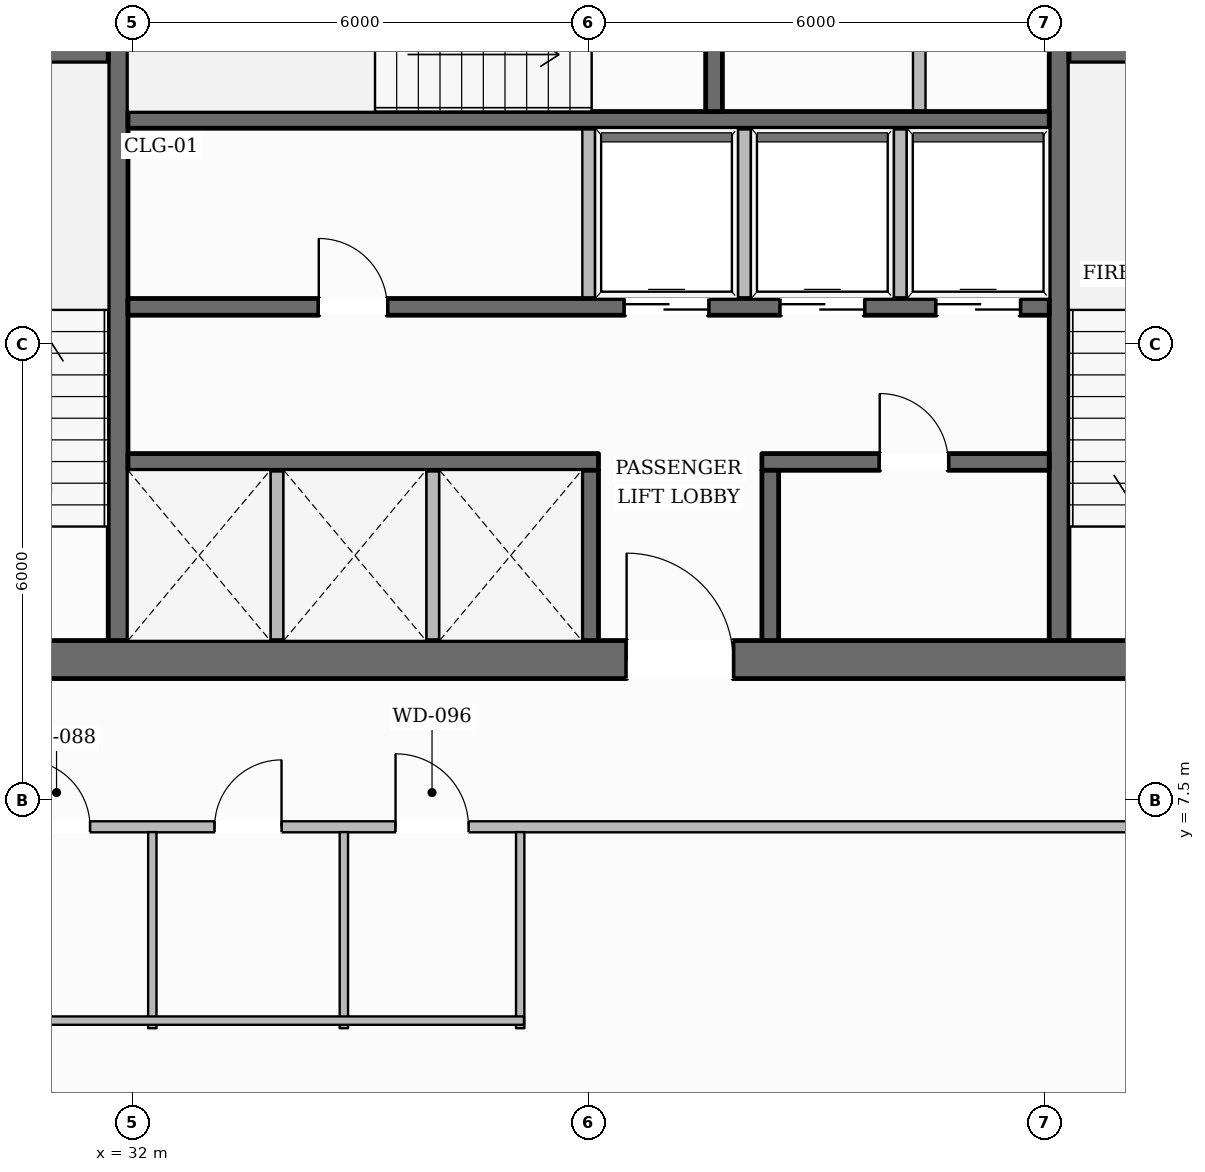
"""IFC4 building model, lengths in metres.
Left out: names, types, materials, properties, quantities, classifications, styles, units other than length and angle.
Written with IfcOpenShell. Run it as: python <this file> out.ifc"""

import sys

from ifc_helpers import new_model, si_unit, direction, frame, frame_2d, origin, place, context, subcontext, project, spatial, rectangle, extrude, element, fill, save


model = new_model("IFC4")
c1 = context("Model", 3, precision=1e-05, world=origin(), true_north=direction((0.0, 1.0)))
c2 = subcontext(c1, "Body", "Model", "MODEL_VIEW")
j1 = project(units=[si_unit("LENGTHUNIT", "METRE"), si_unit("PLANEANGLEUNIT", "RADIAN")], contexts=[c1])
p1 = place(None, origin())
s1 = spatial("IfcSite", under=j1, at=p1, CompositionType="ELEMENT")
p2 = place(p1, origin())
s2 = spatial("IfcBuilding", under=s1, at=p2, CompositionType="ELEMENT")
p3 = place(p2, frame((0.0, 0.0, 97.05)))
s3 = spatial("IfcBuildingStorey", under=s2, at=p3, CompositionType="ELEMENT", Elevation=97.05)
p4 = place(p3, frame((27.98, 9.35, 0.0), z_axis=(0.0, 0.0, 1.0), x_axis=(1.0, 0.0, 0.0)))
e1 = element("IfcWall", 1, at=p4, inside=s3, PredefinedType="SOLIDWALL", context=c2, shape_type="SweptSolid", body=[
    extrude(rectangle(XDim=20.04, YDim=0.5, at=frame_2d((10.02, 0.0))), origin(), (0.0, 0.0, 1.0), 3.6),
])
p5 = place(p4, frame((10.52, 0.0, 0.0)))
e2 = element("IfcOpeningElement", 2, at=p5, cuts=e1, PredefinedType="OPENING", context=c2, shape_type="SweptSolid", body=[
    extrude(rectangle(XDim=1.4, YDim=2.2, at=frame_2d((0.7, 1.1))), frame((0.0, 0.26, 0.0), z_axis=(0.0, -1.0, 0.0), x_axis=(1.0, 0.0, 0.0)), (0.0, 0.0, 1.0), 0.52),
])
p6 = place(p3, frame((31.81, 9.6, 0.0), z_axis=(0.0, 0.0, 1.0), x_axis=(0.0, 1.0, 0.0)))
e3 = element("IfcWall", 3, at=p6, inside=s3, PredefinedType="SHEAR", context=c2, shape_type="SweptSolid", body=[
    extrude(rectangle(XDim=13.0, YDim=0.26, at=frame_2d((6.5, 0.0))), origin(), (0.0, 0.0, 1.0), 3.6),
])
p7 = place(p6, frame((10.925, 0.0, 0.0)))
e4 = element("IfcOpeningElement", 4, at=p7, cuts=e3, PredefinedType="OPENING", context=c2, shape_type="SweptSolid", body=[
    extrude(rectangle(XDim=1.25, YDim=2.25, at=frame_2d((0.625, 1.125))), frame((0.0, 0.14, 0.0), z_axis=(0.0, -1.0, 0.0), x_axis=(1.0, 0.0, 0.0)), (0.0, 0.0, 1.0), 0.28),
])
p8 = place(p3, frame((44.19, 9.6, 0.0), z_axis=(0.0, 0.0, 1.0), x_axis=(0.0, 1.0, 0.0)))
e5 = element("IfcWall", 5, at=p8, inside=s3, PredefinedType="SHEAR", context=c2, shape_type="SweptSolid", body=[
    extrude(rectangle(XDim=13.0, YDim=0.26, at=frame_2d((6.5, 0.0))), origin(), (0.0, 0.0, 1.0), 3.6),
])
p9 = place(p8, frame((10.925, 0.0, 0.0)))
e6 = element("IfcOpeningElement", 6, at=p9, cuts=e5, PredefinedType="OPENING", context=c2, shape_type="SweptSolid", body=[
    extrude(rectangle(XDim=1.25, YDim=2.25, at=frame_2d((0.625, 1.125))), frame((0.0, 0.14, 0.0), z_axis=(0.0, -1.0, 0.0), x_axis=(1.0, 0.0, 0.0)), (0.0, 0.0, 1.0), 0.28),
])
for number, where, z_axis, x_axis in (
    (7, (28.48, 17.33, 0.0), (0.0, 0.0, 1.0), (1.0, 0.0, 0.0)),
    (8, (44.32, 17.33, 0.0), (0.0, 0.0, 1.0), (1.0, 0.0, 0.0)),
):
    element("IfcWall", number, at=place(p3, frame(where, z_axis=z_axis, x_axis=x_axis)), inside=s3, PredefinedType="SHEAR", context=c2, shape_type="SweptSolid", body=[
        extrude(rectangle(XDim=3.2, YDim=0.26, at=frame_2d((1.6, 0.0))), origin(), (0.0, 0.0, 1.0), 3.6),
    ])
p10 = place(p3, frame((31.94, 16.45, 0.0), z_axis=(0.0, 0.0, 1.0), x_axis=(1.0, 0.0, 0.0)))
e9 = element("IfcWall", 9, at=p10, inside=s3, PredefinedType="SOLIDWALL", context=c2, shape_type="SweptSolid", body=[
    extrude(rectangle(XDim=12.12, YDim=0.22, at=frame_2d((6.06, 0.0))), origin(), (0.0, 0.0, 1.0), 3.6),
])
p11 = place(p3, frame((39.65, 16.56, 0.0), z_axis=(0.0, 0.0, 1.0), x_axis=(0.0, 1.0, 0.0)))
e10 = element("IfcWall", 10, at=p11, inside=s3, PredefinedType="SOLIDWALL", context=c2, shape_type="SweptSolid", body=[
    extrude(rectangle(XDim=3.2, YDim=0.22, at=frame_2d((1.6, 0.0))), origin(), (0.0, 0.0, 1.0), 3.6),
])
p12 = place(p3, frame((31.94, 13.99, 0.0), z_axis=(0.0, 0.0, 1.0), x_axis=(1.0, 0.0, 0.0)))
e11 = element("IfcWall", 11, at=p12, inside=s3, PredefinedType="SOLIDWALL", context=c2, shape_type="SweptSolid", body=[
    extrude(rectangle(XDim=12.12, YDim=0.22, at=frame_2d((6.06, 0.0))), origin(), (0.0, 0.0, 1.0), 3.6),
])
p13 = place(p12, frame((2.51, 0.0, 0.0)))
e12 = element("IfcOpeningElement", 12, at=p13, cuts=e11, PredefinedType="OPENING", context=c2, shape_type="SweptSolid", body=[
    extrude(rectangle(XDim=0.9, YDim=2.1, at=frame_2d((0.45, 1.05))), frame((0.0, 0.12, 0.0), z_axis=(0.0, -1.0, 0.0), x_axis=(1.0, 0.0, 0.0)), (0.0, 0.0, 1.0), 0.24),
])
p14 = place(p12, frame((6.535, 0.0, 0.0)))
e13 = element("IfcOpeningElement", 13, at=p14, cuts=e11, PredefinedType="OPENING", context=c2, shape_type="SweptSolid", body=[
    extrude(rectangle(XDim=1.1, YDim=2.2, at=frame_2d((0.55, 1.1))), frame((0.0, 0.12, 0.0), z_axis=(0.0, -1.0, 0.0), x_axis=(1.0, 0.0, 0.0)), (0.0, 0.0, 1.0), 0.24),
])
p15 = place(p12, frame((8.585, 0.0, 0.0)))
e14 = element("IfcOpeningElement", 14, at=p15, cuts=e11, PredefinedType="OPENING", context=c2, shape_type="SweptSolid", body=[
    extrude(rectangle(XDim=1.1, YDim=2.2, at=frame_2d((0.55, 1.1))), frame((0.0, 0.12, 0.0), z_axis=(0.0, -1.0, 0.0), x_axis=(1.0, 0.0, 0.0)), (0.0, 0.0, 1.0), 0.24),
])
p16 = place(p12, frame((10.635, 0.0, 0.0)))
e15 = element("IfcOpeningElement", 15, at=p16, cuts=e11, PredefinedType="OPENING", context=c2, shape_type="SweptSolid", body=[
    extrude(rectangle(XDim=1.1, YDim=2.2, at=frame_2d((0.55, 1.1))), frame((0.0, 0.12, 0.0), z_axis=(0.0, -1.0, 0.0), x_axis=(1.0, 0.0, 0.0)), (0.0, 0.0, 1.0), 0.24),
])
p17 = place(p3, frame((31.94, 11.95, 0.0), z_axis=(0.0, 0.0, 1.0), x_axis=(1.0, 0.0, 0.0)))
e16 = element("IfcWall", 16, at=p17, inside=s3, PredefinedType="SOLIDWALL", context=c2, shape_type="SweptSolid", body=[
    extrude(rectangle(XDim=6.19, YDim=0.22, at=frame_2d((3.095, 0.0))), origin(), (0.0, 0.0, 1.0), 3.6),
])
p18 = place(p3, frame((40.28, 11.95, 0.0), z_axis=(0.0, 0.0, 1.0), x_axis=(1.0, 0.0, 0.0)))
e17 = element("IfcWall", 17, at=p18, inside=s3, PredefinedType="SOLIDWALL", context=c2, shape_type="SweptSolid", body=[
    extrude(rectangle(XDim=3.78, YDim=0.22, at=frame_2d((1.89, 0.0))), origin(), (0.0, 0.0, 1.0), 3.6),
])
p19 = place(p18, frame((1.55, 0.0, 0.0)))
e18 = element("IfcOpeningElement", 18, at=p19, cuts=e17, PredefinedType="OPENING", context=c2, shape_type="SweptSolid", body=[
    extrude(rectangle(XDim=0.9, YDim=2.1, at=frame_2d((0.45, 1.05))), frame((0.0, 0.12, 0.0), z_axis=(0.0, -1.0, 0.0), x_axis=(1.0, 0.0, 0.0)), (0.0, 0.0, 1.0), 0.24),
])
for number, where, z_axis, x_axis in (
    (19, (38.02, 9.6, 0.0), (0.0, 0.0, 1.0), (0.0, 1.0, 0.0)),
    (20, (40.39, 9.6, 0.0), (0.0, 0.0, 1.0), (0.0, 1.0, 0.0)),
):
    element("IfcWall", number, at=place(p3, frame(where, z_axis=z_axis, x_axis=x_axis)), inside=s3, PredefinedType="SOLIDWALL", context=c2, shape_type="SweptSolid", body=[
        extrude(rectangle(XDim=2.24, YDim=0.22, at=frame_2d((1.12, 0.0))), origin(), (0.0, 0.0, 1.0), 3.6),
    ])
p20 = place(p3, frame((14.113, 13.436, 0.0), z_axis=(0.0, 0.0, 1.0), x_axis=(0.493785476093, 0.869583753068, 0.0)))
e21 = element("IfcWall", 21, at=p20, inside=s3, PredefinedType="STANDARD", context=c2, shape_type="SweptSolid", body=[
    extrude(rectangle(XDim=36.023, YDim=0.38, at=frame_2d((18.011, 0.0))), origin(), (0.0, 0.0, 1.0), 3.059),
])
p21 = place(p20, frame((26.417, 0.0, 0.0)))
e22 = element("IfcOpeningElement", 22, at=p21, cuts=e21, PredefinedType="OPENING", context=c2, shape_type="SweptSolid", body=[
    extrude(rectangle(XDim=1.0, YDim=2.2, at=frame_2d((0.5, 1.1))), frame((0.0, 0.2, 0.0), z_axis=(0.0, -1.0, 0.0), x_axis=(1.0, 0.0, 0.0)), (0.0, 0.0, 1.0), 0.4),
])
p22 = place(p20, frame((31.845, 0.0, 0.65)))
e23 = element("IfcOpeningElement", 23, at=p22, cuts=e21, PredefinedType="OPENING", context=c2, shape_type="SweptSolid", body=[
    extrude(rectangle(XDim=1.55, YDim=1.75, at=frame_2d((0.775, 0.875))), frame((0.0, 0.2, 0.0), z_axis=(0.0, -1.0, 0.0), x_axis=(1.0, 0.0, 0.0)), (0.0, 0.0, 1.0), 0.4),
])
p23 = place(p20, frame((20.156, 0.0, 0.65)))
e24 = element("IfcOpeningElement", 24, at=p23, cuts=e21, PredefinedType="OPENING", context=c2, shape_type="SweptSolid", body=[
    extrude(rectangle(XDim=1.55, YDim=1.75, at=frame_2d((0.775, 0.875))), frame((0.0, 0.2, 0.0), z_axis=(0.0, -1.0, 0.0), x_axis=(1.0, 0.0, 0.0)), (0.0, 0.0, 1.0), 0.4),
])
p24 = place(p20, frame((8.466, 0.0, 0.65)))
e25 = element("IfcOpeningElement", 25, at=p24, cuts=e21, PredefinedType="OPENING", context=c2, shape_type="SweptSolid", body=[
    extrude(rectangle(XDim=1.55, YDim=1.75, at=frame_2d((0.775, 0.875))), frame((0.0, 0.2, 0.0), z_axis=(0.0, -1.0, 0.0), x_axis=(1.0, 0.0, 0.0)), (0.0, 0.0, 1.0), 0.4),
])
p25 = place(p20, frame((2.621, 0.0, 0.65)))
e26 = element("IfcOpeningElement", 26, at=p25, cuts=e21, PredefinedType="OPENING", context=c2, shape_type="SweptSolid", body=[
    extrude(rectangle(XDim=1.55, YDim=1.75, at=frame_2d((0.775, 0.875))), frame((0.0, 0.2, 0.0), z_axis=(0.0, -1.0, 0.0), x_axis=(1.0, 0.0, 0.0)), (0.0, 0.0, 1.0), 0.4),
])
p26 = place(p3, frame((44.161, 44.724, 0.0), z_axis=(0.0, 0.0, 1.0), x_axis=(0.496205042728, -0.86820536486, 0.0)))
e27 = element("IfcWall", 27, at=p26, inside=s3, PredefinedType="STANDARD", context=c2, shape_type="SweptSolid", body=[
    extrude(rectangle(XDim=36.193, YDim=0.38, at=frame_2d((18.097, 0.0))), origin(), (0.0, 0.0, 1.0), 3.059),
])
p27 = place(p26, frame((32.008, 0.0, 0.65)))
e28 = element("IfcOpeningElement", 28, at=p27, cuts=e27, PredefinedType="OPENING", context=c2, shape_type="SweptSolid", body=[
    extrude(rectangle(XDim=1.55, YDim=1.75, at=frame_2d((0.775, 0.875))), frame((0.0, 0.2, 0.0), z_axis=(0.0, -1.0, 0.0), x_axis=(1.0, 0.0, 0.0)), (0.0, 0.0, 1.0), 0.4),
])
p28 = place(p26, frame((26.134, 0.0, 0.65)))
e29 = element("IfcOpeningElement", 29, at=p28, cuts=e27, PredefinedType="OPENING", context=c2, shape_type="SweptSolid", body=[
    extrude(rectangle(XDim=1.55, YDim=1.75, at=frame_2d((0.775, 0.875))), frame((0.0, 0.2, 0.0), z_axis=(0.0, -1.0, 0.0), x_axis=(1.0, 0.0, 0.0)), (0.0, 0.0, 1.0), 0.4),
])
p29 = place(p26, frame((20.26, 0.0, 0.65)))
e30 = element("IfcOpeningElement", 30, at=p29, cuts=e27, PredefinedType="OPENING", context=c2, shape_type="SweptSolid", body=[
    extrude(rectangle(XDim=1.55, YDim=1.75, at=frame_2d((0.775, 0.875))), frame((0.0, 0.2, 0.0), z_axis=(0.0, -1.0, 0.0), x_axis=(1.0, 0.0, 0.0)), (0.0, 0.0, 1.0), 0.4),
])
p30 = place(p26, frame((8.513, 0.0, 0.65)))
e31 = element("IfcOpeningElement", 31, at=p30, cuts=e27, PredefinedType="OPENING", context=c2, shape_type="SweptSolid", body=[
    extrude(rectangle(XDim=1.55, YDim=1.75, at=frame_2d((0.775, 0.875))), frame((0.0, 0.2, 0.0), z_axis=(0.0, -1.0, 0.0), x_axis=(1.0, 0.0, 0.0)), (0.0, 0.0, 1.0), 0.4),
])
p31 = place(p26, frame((2.639, 0.0, 0.65)))
e32 = element("IfcOpeningElement", 32, at=p31, cuts=e27, PredefinedType="OPENING", context=c2, shape_type="SweptSolid", body=[
    extrude(rectangle(XDim=1.55, YDim=1.75, at=frame_2d((0.775, 0.875))), frame((0.0, 0.2, 0.0), z_axis=(0.0, -1.0, 0.0), x_axis=(1.0, 0.0, 0.0)), (0.0, 0.0, 1.0), 0.4),
])
for number, where, z_axis, x_axis in (
    (33, (33.9, 9.55, 0.0), (0.0, 0.0, 1.0), (0.0, 1.0, 0.0)),
    (34, (35.95, 9.55, 0.0), (0.0, 0.0, 1.0), (0.0, 1.0, 0.0)),
):
    element("IfcWall", number, at=place(p3, frame(where, z_axis=z_axis, x_axis=x_axis)), inside=s3, PredefinedType="PARTITIONING", context=c2, shape_type="SweptSolid", body=[
        extrude(rectangle(XDim=2.29, YDim=0.165, at=frame_2d((1.145, 0.0))), origin(), (0.0, 0.0, 1.0), 3.6),
    ])
for number, where, z_axis, x_axis in (
    (35, (38.0, 14.1, 0.0), (0.0, 0.0, 1.0), (0.0, 1.0, 0.0)),
    (36, (40.05, 14.1, 0.0), (0.0, 0.0, 1.0), (0.0, 1.0, 0.0)),
    (37, (42.1, 14.1, 0.0), (0.0, 0.0, 1.0), (0.0, 1.0, 0.0)),
):
    element("IfcWall", number, at=place(p3, frame(where, z_axis=z_axis, x_axis=x_axis)), inside=s3, PredefinedType="PARTITIONING", context=c2, shape_type="SweptSolid", body=[
        extrude(rectangle(XDim=2.24, YDim=0.165, at=frame_2d((1.12, 0.0))), origin(), (0.0, 0.0, 1.0), 3.6),
    ])
p32 = place(p3, frame((42.35, 16.56, 0.0), z_axis=(0.0, 0.0, 1.0), x_axis=(0.0, 1.0, 0.0)))
e38 = element("IfcWall", 38, at=p32, inside=s3, PredefinedType="PARTITIONING", context=c2, shape_type="SweptSolid", body=[
    extrude(rectangle(XDim=3.2, YDim=0.165, at=frame_2d((1.6, 0.0))), origin(), (0.0, 0.0, 1.0), 3.6),
])
p33 = place(p3, frame((26.03, 7.15, 0.0), z_axis=(0.0, 0.0, 1.0), x_axis=(1.0, 0.0, 0.0)))
e39 = element("IfcWall", 39, at=p33, inside=s3, PredefinedType="PARTITIONING", context=c2, shape_type="SweptSolid", body=[
    extrude(rectangle(XDim=23.94, YDim=0.145, at=frame_2d((11.97, 0.0))), origin(), (0.0, 0.0, 1.0), 3.6),
])
p34 = place(p33, frame((4.53, 0.0, 0.0)))
e40 = element("IfcOpeningElement", 40, at=p34, cuts=e39, PredefinedType="OPENING", context=c2, shape_type="SweptSolid", body=[
    extrude(rectangle(XDim=0.88, YDim=2.1, at=frame_2d((0.44, 1.05))), frame((0.0, 0.083, 0.0), z_axis=(0.0, -1.0, 0.0), x_axis=(1.0, 0.0, 0.0)), (0.0, 0.0, 1.0), 0.165),
])
p35 = place(p33, frame((7.05, 0.0, 0.0)))
e41 = element("IfcOpeningElement", 41, at=p35, cuts=e39, PredefinedType="OPENING", context=c2, shape_type="SweptSolid", body=[
    extrude(rectangle(XDim=0.88, YDim=2.1, at=frame_2d((0.44, 1.05))), frame((0.0, 0.083, 0.0), z_axis=(0.0, -1.0, 0.0), x_axis=(1.0, 0.0, 0.0)), (0.0, 0.0, 1.0), 0.165),
])
p36 = place(p33, frame((9.43, 0.0, 0.0)))
e42 = element("IfcOpeningElement", 42, at=p36, cuts=e39, PredefinedType="OPENING", context=c2, shape_type="SweptSolid", body=[
    extrude(rectangle(XDim=0.96, YDim=2.1, at=frame_2d((0.48, 1.05))), frame((0.0, 0.083, 0.0), z_axis=(0.0, -1.0, 0.0), x_axis=(1.0, 0.0, 0.0)), (0.0, 0.0, 1.0), 0.165),
])
p37 = place(p3, frame((32.26, 4.5, 0.0), z_axis=(0.0, 0.0, 1.0), x_axis=(0.0, 1.0, 0.0)))
e43 = element("IfcWall", 43, at=p37, inside=s3, PredefinedType="PLUMBINGWALL", context=c2, shape_type="SweptSolid", body=[
    extrude(rectangle(XDim=2.58, YDim=0.11, at=frame_2d((1.29, 0.0))), origin(), (0.0, 0.0, 1.0), 3.141),
])
for number, where, z_axis, x_axis in (
    (44, (34.78, 4.5, 0.0), (0.0, 0.0, 1.0), (0.0, 1.0, 0.0)),
    (45, (37.1, 4.5, 0.0), (0.0, 0.0, 1.0), (0.0, 1.0, 0.0)),
):
    element("IfcWall", number, at=place(p3, frame(where, z_axis=z_axis, x_axis=x_axis)), inside=s3, PredefinedType="PLUMBINGWALL", context=c2, shape_type="SweptSolid", body=[
        extrude(rectangle(XDim=2.58, YDim=0.11, at=frame_2d((1.29, 0.0))), origin(), (0.0, 0.0, 1.0), 3.6),
    ])
p38 = place(p3, frame((29.69, 4.6, 0.0), z_axis=(0.0, 0.0, 1.0), x_axis=(1.0, 0.0, 0.0)))
e46 = element("IfcWall", 46, at=p38, inside=s3, PredefinedType="PLUMBINGWALL", context=c2, shape_type="SweptSolid", body=[
    extrude(rectangle(XDim=7.46, YDim=0.11, at=frame_2d((3.73, 0.0))), origin(), (0.0, 0.0, 1.0), 3.6),
])
p39 = place(p5, origin())
e47 = element("IfcDoor", 47, at=p39, inside=s3, OperationType="SINGLE_SWING_LEFT", PredefinedType="DOOR", context=c2, shape_type="SweptSolid", body=[
    extrude(rectangle(XDim=1.4, YDim=2.2, at=frame_2d((0.7, 1.1))), frame((0.0, 0.025, 0.0), z_axis=(0.0, -1.0, 0.0), x_axis=(1.0, 0.0, 0.0)), (0.0, 0.0, 1.0), 0.05),
])
fill(e2, e47)
p40 = place(p13, origin())
e48 = element("IfcDoor", 48, at=p40, inside=s3, OperationType="SINGLE_SWING_LEFT", PredefinedType="DOOR", context=c2, shape_type="SweptSolid", body=[
    extrude(rectangle(XDim=0.9, YDim=2.1, at=frame_2d((0.45, 1.05))), frame((0.0, 0.025, 0.0), z_axis=(0.0, -1.0, 0.0), x_axis=(1.0, 0.0, 0.0)), (0.0, 0.0, 1.0), 0.05),
])
fill(e12, e48)
p41 = place(p14, origin())
e49 = element("IfcDoor", 49, at=p41, inside=s3, OperationType="DOUBLE_DOOR_SLIDING", PredefinedType="DOOR", context=c2, shape_type="SweptSolid", body=[
    extrude(rectangle(XDim=1.1, YDim=2.2, at=frame_2d((0.55, 1.1))), frame((0.0, 0.025, 0.0), z_axis=(0.0, -1.0, 0.0), x_axis=(1.0, 0.0, 0.0)), (0.0, 0.0, 1.0), 0.05),
])
fill(e13, e49)
p42 = place(p15, origin())
e50 = element("IfcDoor", 50, at=p42, inside=s3, OperationType="DOUBLE_DOOR_SLIDING", PredefinedType="DOOR", context=c2, shape_type="SweptSolid", body=[
    extrude(rectangle(XDim=1.1, YDim=2.2, at=frame_2d((0.55, 1.1))), frame((0.0, 0.025, 0.0), z_axis=(0.0, -1.0, 0.0), x_axis=(1.0, 0.0, 0.0)), (0.0, 0.0, 1.0), 0.05),
])
fill(e14, e50)
p43 = place(p16, origin())
e51 = element("IfcDoor", 51, at=p43, inside=s3, OperationType="DOUBLE_DOOR_SLIDING", PredefinedType="DOOR", context=c2, shape_type="SweptSolid", body=[
    extrude(rectangle(XDim=1.1, YDim=2.2, at=frame_2d((0.55, 1.1))), frame((0.0, 0.025, 0.0), z_axis=(0.0, -1.0, 0.0), x_axis=(1.0, 0.0, 0.0)), (0.0, 0.0, 1.0), 0.05),
])
fill(e15, e51)
p44 = place(p19, origin())
e52 = element("IfcDoor", 52, at=p44, inside=s3, OperationType="SINGLE_SWING_LEFT", PredefinedType="DOOR", context=c2, shape_type="SweptSolid", body=[
    extrude(rectangle(XDim=0.9, YDim=2.1, at=frame_2d((0.45, 1.05))), frame((0.0, 0.025, 0.0), z_axis=(0.0, -1.0, 0.0), x_axis=(1.0, 0.0, 0.0)), (0.0, 0.0, 1.0), 0.05),
])
fill(e18, e52)
p45 = place(p34, origin())
e53 = element("IfcDoor", 53, at=p45, inside=s3, OperationType="SINGLE_SWING_LEFT", PredefinedType="DOOR", context=c2, shape_type="SweptSolid", body=[
    extrude(rectangle(XDim=0.88, YDim=2.1, at=frame_2d((0.44, 1.05))), frame((0.0, 0.025, 0.0), z_axis=(0.0, -1.0, 0.0), x_axis=(1.0, 0.0, 0.0)), (0.0, 0.0, 1.0), 0.05),
])
fill(e40, e53)
p46 = place(p35, origin())
e54 = element("IfcDoor", 54, at=p46, inside=s3, OperationType="SINGLE_SWING_RIGHT", PredefinedType="DOOR", context=c2, shape_type="SweptSolid", body=[
    extrude(rectangle(XDim=0.88, YDim=2.1, at=frame_2d((0.44, 1.05))), frame((0.0, 0.025, 0.0), z_axis=(0.0, -1.0, 0.0), x_axis=(1.0, 0.0, 0.0)), (0.0, 0.0, 1.0), 0.05),
])
fill(e41, e54)
p47 = place(p36, origin())
e55 = element("IfcDoor", 55, at=p47, inside=s3, OperationType="SINGLE_SWING_LEFT", PredefinedType="DOOR", context=c2, shape_type="SweptSolid", body=[
    extrude(rectangle(XDim=0.96, YDim=2.1, at=frame_2d((0.48, 1.05))), frame((0.0, 0.025, 0.0), z_axis=(0.0, -1.0, 0.0), x_axis=(1.0, 0.0, 0.0)), (0.0, 0.0, 1.0), 0.05),
])
fill(e42, e55)
save(model, sys.argv[1])
